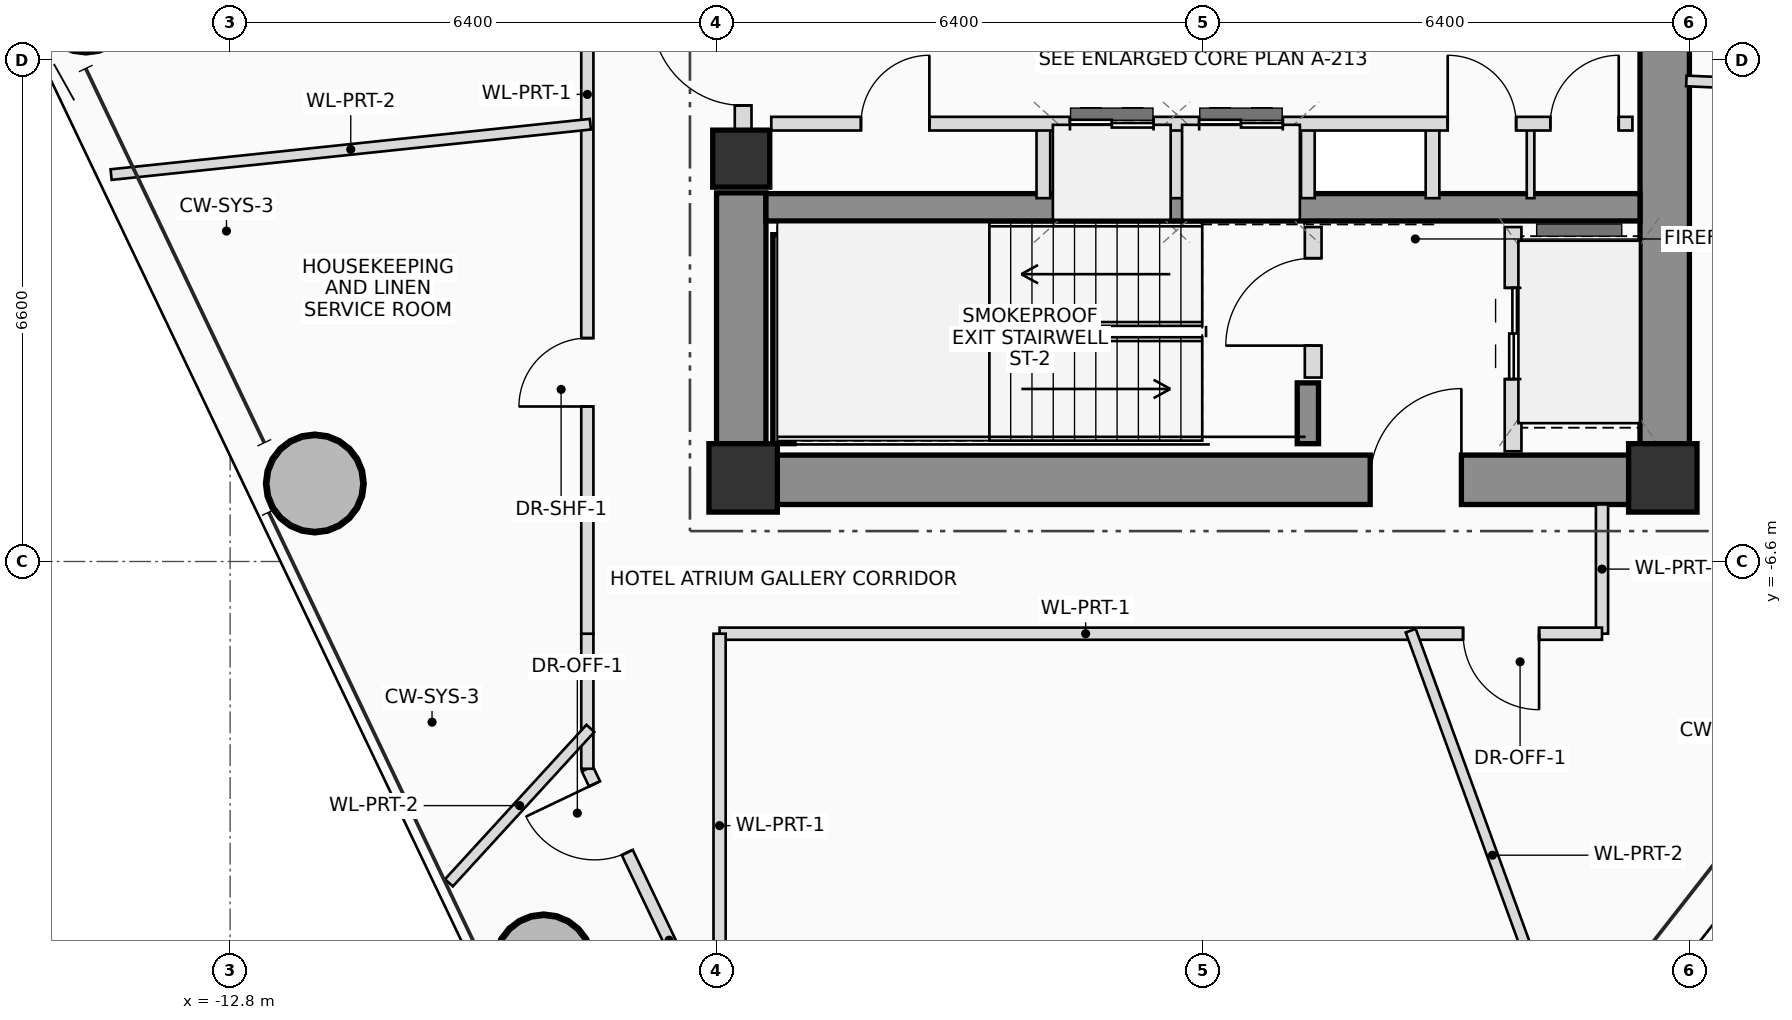
"""IFC4 building model, lengths in metres.
Left out: names, types, materials, properties, quantities, classifications, styles, units other than length and angle.
Written with IfcOpenShell. Run it as: python <this file> out.ifc"""

import sys

from ifc_helpers import new_model, si_unit, direction, frame, frame_2d, origin, origin_2d, place, context, subcontext, project, spatial, rectangle, hollow_circle, extrude, source, transform, mapped, element, fill, save


model = new_model("IFC4")
c1 = context("Model", 3, precision=1e-05, world=origin(), true_north=direction((0.0, 1.0)))
c2 = subcontext(c1, "Body", "Model", "MODEL_VIEW")
j1 = project(units=[si_unit("LENGTHUNIT", "METRE"), si_unit("PLANEANGLEUNIT", "RADIAN")], contexts=[c1])
p1 = place(None, origin())
s1 = spatial("IfcSite", under=j1, at=p1, CompositionType="ELEMENT")
p2 = place(p1, origin())
s2 = spatial("IfcBuilding", under=s1, at=p2, CompositionType="ELEMENT")
p3 = place(p2, frame((0.0, 0.0, 129.5)))
s3 = spatial("IfcBuildingStorey", under=s2, at=p3, CompositionType="ELEMENT", Elevation=129.5)
m1 = source(origin(), c2, "Body", "SweptSolid", [
    extrude(rectangle(XDim=0.9, YDim=0.9, at=origin_2d()), origin(), (0.0, 0.0, 1.0), 3.45),
])
for number, where, z_axis, x_axis in (
    (1, (-6.05, -5.5, 0.0), (0.0, 0.0, 1.0), (1.0, 0.0, 0.0)),
    (2, (6.05, -5.5, 0.0), (0.0, 0.0, 1.0), (1.0, 0.0, 0.0)),
):
    element("IfcColumn", number, at=place(p3, frame(where, z_axis=z_axis, x_axis=x_axis)), inside=s3, PredefinedType="COLUMN", context=c2, shape_type="MappedRepresentation", body=[
        mapped(m1, transform((0.0, 0.0, 0.0), scale=1.0)),
    ])
p4 = place(p3, frame((-6.4, -5.525, 0.0), z_axis=(0.0, 0.0, 1.0), x_axis=(1.0, 0.0, 0.0)))
e3 = element("IfcWall", 3, at=p4, inside=s3, PredefinedType="SHEAR", context=c2, shape_type="SweptSolid", body=[
    extrude(rectangle(XDim=12.8, YDim=0.65, at=frame_2d((6.4, 0.0))), origin(), (0.0, 0.0, 1.0), 3.45),
])
p5 = place(p4, frame((8.6, 0.0, 0.0)))
e4 = element("IfcOpeningElement", 4, at=p5, cuts=e3, PredefinedType="OPENING", context=c2, shape_type="SweptSolid", body=[
    extrude(rectangle(XDim=1.2, YDim=2.2, at=frame_2d((0.6, 1.1))), frame((0.0, 0.335, 0.0), z_axis=(0.0, -1.0, 0.0), x_axis=(1.0, 0.0, 0.0)), (0.0, 0.0, 1.0), 0.67),
])
p6 = place(p3, frame((6.075, -5.2, 0.0), z_axis=(0.0, 0.0, 1.0), x_axis=(0.0, 1.0, 0.0)))
e5 = element("IfcWall", 5, at=p6, inside=s3, PredefinedType="SHEAR", context=c2, shape_type="SweptSolid", body=[
    extrude(rectangle(XDim=10.4, YDim=0.65, at=frame_2d((5.2, 0.0))), origin(), (0.0, 0.0, 1.0), 3.45),
])
p7 = place(p3, frame((-6.075, -5.2, 0.0), z_axis=(0.0, 0.0, 1.0), x_axis=(0.0, 1.0, 0.0)))
e6 = element("IfcWall", 6, at=p7, inside=s3, PredefinedType="SHEAR", context=c2, shape_type="SweptSolid", body=[
    extrude(rectangle(XDim=3.45, YDim=0.65, at=frame_2d((1.725, 0.0))), origin(), (0.0, 0.0, 1.0), 3.45),
])
p8 = place(p3, frame((-5.75, -1.94, 0.0), z_axis=(0.0, 0.0, 1.0), x_axis=(1.0, 0.0, 0.0)))
e7 = element("IfcWall", 7, at=p8, inside=s3, PredefinedType="SHEAR", context=c2, shape_type="SweptSolid", body=[
    extrude(rectangle(XDim=11.5, YDim=0.36, at=frame_2d((5.75, 0.0))), origin(), (0.0, 0.0, 1.0), 3.45),
])
p9 = place(p3, frame((-5.52, -5.05, 0.0), z_axis=(0.0, 0.0, 1.0), x_axis=(0.0, 1.0, 0.0)))
e8 = element("IfcWall", 8, at=p9, inside=s3, PredefinedType="SHEAR", context=c2, shape_type="SweptSolid", body=[
    extrude(rectangle(XDim=2.75, YDim=0.28, at=frame_2d((1.375, 0.0))), origin(), (0.0, 0.0, 1.0), 3.45),
])
p10 = place(p3, frame((1.38, -5.05, 0.0), z_axis=(0.0, 0.0, 1.0), x_axis=(0.0, 1.0, 0.0)))
e9 = element("IfcWall", 9, at=p10, inside=s3, PredefinedType="SHEAR", context=c2, shape_type="SweptSolid", body=[
    extrude(rectangle(XDim=0.8, YDim=0.28, at=frame_2d((0.4, 0.0))), origin(), (0.0, 0.0, 1.0), 3.45),
])
m2 = source(origin(), c2, "Body", "SweptSolid", [
    extrude(rectangle(XDim=0.75, YDim=0.75, at=origin_2d()), origin(), (0.0, 0.0, 1.0), 3.45),
])
p11 = place(p3, frame((-6.075, -1.3, 0.0), z_axis=(0.0, 0.0, 1.0), x_axis=(1.0, 0.0, 0.0)))
e10 = element("IfcColumn", 10, at=p11, inside=s3, PredefinedType="COLUMN", context=c2, shape_type="MappedRepresentation", body=[
    mapped(m2, transform((0.0, 0.0, 0.0), scale=1.0)),
])
m3 = source(origin(), c2, "Body", "SweptSolid", [
    extrude(hollow_circle(Radius=0.65, WallThickness=0.045, at=origin_2d()), origin(), (0.0, 0.0, 1.0), 3.45),
])
for number, where, z_axis, x_axis in (
    (11, (-14.697, 0.74, 0.0), (0.0, 0.0, 1.0), (1.0, 0.0, 0.0)),
    (12, (-11.685, -5.573, 0.0), (0.0, 0.0, 1.0), (1.0, 0.0, 0.0)),
    (13, (-8.674, -11.888, 0.0), (0.0, 0.0, 1.0), (1.0, 0.0, 0.0)),
):
    element("IfcColumn", number, at=place(p3, frame(where, z_axis=z_axis, x_axis=x_axis)), inside=s3, PredefinedType="COLUMN", context=c2, shape_type="MappedRepresentation", body=[
        mapped(m3, transform((0.0, 0.0, 0.0), scale=1.0)),
    ])
p12 = place(p3, frame((-6.05, -0.95, 0.0), z_axis=(0.0, 0.0, 1.0), x_axis=(0.0, 1.0, 0.0)))
e14 = element("IfcWall", 14, at=p12, inside=s3, PredefinedType="PLUMBINGWALL", context=c2, shape_type="SweptSolid", body=[
    extrude(rectangle(XDim=1.9, YDim=0.22, at=frame_2d((0.95, 0.0))), origin(), (0.0, 0.0, 1.0), 2.23),
])
p13 = place(p12, frame((0.35, 0.0, 0.0)))
e15 = element("IfcOpeningElement", 15, at=p13, cuts=e14, PredefinedType="OPENING", context=c2, shape_type="SweptSolid", body=[
    extrude(rectangle(XDim=1.2, YDim=2.2, at=frame_2d((0.6, 1.1))), frame((0.0, 0.12, 0.0), z_axis=(0.0, -1.0, 0.0), x_axis=(1.0, 0.0, 0.0)), (0.0, 0.0, 1.0), 0.24),
])
p14 = place(p3, frame((1.45, -4.18, 0.0), z_axis=(0.0, 0.0, 1.0), x_axis=(0.0, 1.0, 0.0)))
e16 = element("IfcWall", 16, at=p14, inside=s3, PredefinedType="PLUMBINGWALL", context=c2, shape_type="SweptSolid", body=[
    extrude(rectangle(XDim=1.98, YDim=0.22, at=frame_2d((0.99, 0.0))), origin(), (0.0, 0.0, 1.0), 3.25),
])
p15 = place(p14, frame((0.42, 0.0, 0.0)))
e17 = element("IfcOpeningElement", 17, at=p15, cuts=e16, PredefinedType="OPENING", context=c2, shape_type="SweptSolid", body=[
    extrude(rectangle(XDim=1.15, YDim=2.15, at=frame_2d((0.575, 1.075))), frame((0.0, 0.12, 0.0), z_axis=(0.0, -1.0, 0.0), x_axis=(1.0, 0.0, 0.0)), (0.0, 0.0, 1.0), 0.24),
])
p16 = place(p3, frame((4.08, -5.15, 0.0), z_axis=(0.0, 0.0, 1.0), x_axis=(0.0, 1.0, 0.0)))
e18 = element("IfcWall", 18, at=p16, inside=s3, PredefinedType="PLUMBINGWALL", context=c2, shape_type="SweptSolid", body=[
    extrude(rectangle(XDim=2.95, YDim=0.22, at=frame_2d((1.475, 0.0))), origin(), (0.0, 0.0, 1.0), 3.25),
])
p17 = place(p16, frame((0.95, 0.0, 0.0)))
e19 = element("IfcOpeningElement", 19, at=p17, cuts=e18, PredefinedType="OPENING", context=c2, shape_type="SweptSolid", body=[
    extrude(rectangle(XDim=1.2, YDim=2.25, at=frame_2d((0.6, 1.125))), frame((0.0, 0.12, 0.0), z_axis=(0.0, -1.0, 0.0), x_axis=(1.0, 0.0, 0.0)), (0.0, 0.0, 1.0), 0.24),
])
for number, where, z_axis, x_axis in (
    (20, (-2.1, -1.82, 0.0), (0.0, 0.0, 1.0), (0.0, 1.0, 0.0)),
    (21, (-0.35, -1.82, 0.0), (0.0, 0.0, 1.0), (0.0, 1.0, 0.0)),
    (22, (1.38, -1.82, 0.0), (0.0, 0.0, 1.0), (0.0, 1.0, 0.0)),
    (23, (3.02, -1.82, 0.0), (0.0, 0.0, 1.0), (0.0, 1.0, 0.0)),
):
    element("IfcWall", number, at=place(p3, frame(where, z_axis=z_axis, x_axis=x_axis)), inside=s3, PredefinedType="PLUMBINGWALL", context=c2, shape_type="SweptSolid", body=[
        extrude(rectangle(XDim=0.98, YDim=0.18, at=frame_2d((0.49, 0.0))), origin(), (0.0, 0.0, 1.0), 3.25),
    ])
p18 = place(p3, frame((4.31, -1.82, 0.0), z_axis=(0.0, 0.0, 1.0), x_axis=(0.0, 1.0, 0.0)))
e24 = element("IfcWall", 24, at=p18, inside=s3, PredefinedType="PARTITIONING", context=c2, shape_type="SweptSolid", body=[
    extrude(rectangle(XDim=0.98, YDim=0.1, at=frame_2d((0.49, 0.0))), origin(), (0.0, 0.0, 1.0), 3.25),
])
p19 = place(p3, frame((-5.68, -0.84, 0.0), z_axis=(0.0, 0.0, 1.0), x_axis=(1.0, 0.0, 0.0)))
e25 = element("IfcWall", 25, at=p19, inside=s3, PredefinedType="PLUMBINGWALL", context=c2, shape_type="SweptSolid", body=[
    extrude(rectangle(XDim=11.33, YDim=0.18, at=frame_2d((5.665, 0.0))), origin(), (0.0, 0.0, 1.0), 3.25),
])
p20 = place(p19, frame((1.18, 0.0, 0.0)))
e26 = element("IfcOpeningElement", 26, at=p20, cuts=e25, PredefinedType="OPENING", context=c2, shape_type="SweptSolid", body=[
    extrude(rectangle(XDim=0.9, YDim=2.05, at=frame_2d((0.45, 1.025))), frame((0.0, 0.1, 0.0), z_axis=(0.0, -1.0, 0.0), x_axis=(1.0, 0.0, 0.0)), (0.0, 0.0, 1.0), 0.2),
])
p21 = place(p19, frame((3.93, 0.0, 0.0)))
e27 = element("IfcOpeningElement", 27, at=p21, cuts=e25, PredefinedType="OPENING", context=c2, shape_type="SweptSolid", body=[
    extrude(rectangle(XDim=1.1, YDim=2.2, at=frame_2d((0.55, 1.1))), frame((0.0, 0.1, 0.0), z_axis=(0.0, -1.0, 0.0), x_axis=(1.0, 0.0, 0.0)), (0.0, 0.0, 1.0), 0.2),
])
p22 = place(p19, frame((5.63, 0.0, 0.0)))
e28 = element("IfcOpeningElement", 28, at=p22, cuts=e25, PredefinedType="OPENING", context=c2, shape_type="SweptSolid", body=[
    extrude(rectangle(XDim=1.1, YDim=2.2, at=frame_2d((0.55, 1.1))), frame((0.0, 0.1, 0.0), z_axis=(0.0, -1.0, 0.0), x_axis=(1.0, 0.0, 0.0)), (0.0, 0.0, 1.0), 0.2),
])
p23 = place(p19, frame((8.9, 0.0, 0.0)))
e29 = element("IfcOpeningElement", 29, at=p23, cuts=e25, PredefinedType="OPENING", context=c2, shape_type="SweptSolid", body=[
    extrude(rectangle(XDim=0.9, YDim=2.05, at=frame_2d((0.45, 1.025))), frame((0.0, 0.1, 0.0), z_axis=(0.0, -1.0, 0.0), x_axis=(1.0, 0.0, 0.0)), (0.0, 0.0, 1.0), 0.2),
])
p24 = place(p19, frame((10.25, 0.0, 0.0)))
e30 = element("IfcOpeningElement", 30, at=p24, cuts=e25, PredefinedType="OPENING", context=c2, shape_type="SweptSolid", body=[
    extrude(rectangle(XDim=0.9, YDim=2.05, at=frame_2d((0.45, 1.025))), frame((0.0, 0.1, 0.0), z_axis=(0.0, -1.0, 0.0), x_axis=(1.0, 0.0, 0.0)), (0.0, 0.0, 1.0), 0.2),
])
p25 = place(p3, frame((-6.539, -12.6, 0.0), z_axis=(0.0, 0.0, 1.0), x_axis=(-0.430521464151, 0.902580339308, 0.0)))
e31 = element("IfcWall", 31, at=p25, inside=s3, PredefinedType="PARTITIONING", context=c2, shape_type="SweptSolid", body=[
    extrude(rectangle(XDim=3.626, YDim=0.16, at=frame_2d((1.813, 0.0))), origin(), (0.0, 0.0, 1.0), 2.605),
])
p26 = place(p25, frame((2.406, 0.0, 0.0)))
e32 = element("IfcOpeningElement", 32, at=p26, cuts=e31, PredefinedType="OPENING", context=c2, shape_type="SweptSolid", body=[
    extrude(rectangle(XDim=1.0, YDim=2.25, at=frame_2d((0.5, 1.125))), frame((0.0, 0.09, 0.0), z_axis=(0.0, -1.0, 0.0), x_axis=(1.0, 0.0, 0.0)), (0.0, 0.0, 1.0), 0.18),
])
p27 = place(p3, frame((-8.1, -9.327, 0.0), z_axis=(0.0, 0.0, 1.0), x_axis=(0.0, 1.0, 0.0)))
e33 = element("IfcWall", 33, at=p27, inside=s3, PredefinedType="PARTITIONING", context=c2, shape_type="SweptSolid", body=[
    extrude(rectangle(XDim=1.777, YDim=0.16, at=frame_2d((0.888, 0.0))), origin(), (0.0, 0.0, 1.0), 3.25),
])
p28 = place(p3, frame((-8.1, -7.55, 0.0), z_axis=(0.0, 0.0, 1.0), x_axis=(0.0, 1.0, 0.0)))
e34 = element("IfcWall", 34, at=p28, inside=s3, PredefinedType="PARTITIONING", context=c2, shape_type="SweptSolid", body=[
    extrude(rectangle(XDim=15.1, YDim=0.16, at=frame_2d((7.55, 0.0))), origin(), (0.0, 0.0, 1.0), 2.605),
])
p29 = place(p28, frame((2.989, 0.0, 0.0)))
e35 = element("IfcOpeningElement", 35, at=p29, cuts=e34, PredefinedType="OPENING", context=c2, shape_type="SweptSolid", body=[
    extrude(rectangle(XDim=0.9, YDim=2.05, at=frame_2d((0.45, 1.025))), frame((0.0, 0.09, 0.0), z_axis=(0.0, -1.0, 0.0), x_axis=(1.0, 0.0, 0.0)), (0.0, 0.0, 1.0), 0.18),
])
p30 = place(p28, frame((10.301, 0.0, 0.0)))
e36 = element("IfcOpeningElement", 36, at=p30, cuts=e34, PredefinedType="OPENING", context=c2, shape_type="SweptSolid", body=[
    extrude(rectangle(XDim=1.0, YDim=2.25, at=frame_2d((0.5, 1.125))), frame((0.0, 0.09, 0.0), z_axis=(0.0, -1.0, 0.0), x_axis=(1.0, 0.0, 0.0)), (0.0, 0.0, 1.0), 0.18),
])
p31 = place(p3, frame((5.25, -5.85, 0.0), z_axis=(0.0, 0.0, 1.0), x_axis=(0.0, -1.0, 0.0)))
e37 = element("IfcWall", 37, at=p31, inside=s3, PredefinedType="PARTITIONING", context=c2, shape_type="SweptSolid", body=[
    extrude(rectangle(XDim=1.7, YDim=0.16, at=frame_2d((0.85, 0.0))), origin(), (0.0, 0.0, 1.0), 3.25),
])
p32 = place(p3, frame((5.25, -7.55, 0.0), z_axis=(0.0, 0.0, 1.0), x_axis=(-1.0, 0.0, 0.0)))
e38 = element("IfcWall", 38, at=p32, inside=s3, PredefinedType="PARTITIONING", context=c2, shape_type="SweptSolid", body=[
    extrude(rectangle(XDim=11.61, YDim=0.16, at=frame_2d((5.805, 0.0))), origin(), (0.0, 0.0, 1.0), 2.605),
])
p33 = place(p32, frame((0.828, 0.0, 0.0)))
e39 = element("IfcOpeningElement", 39, at=p33, cuts=e38, PredefinedType="OPENING", context=c2, shape_type="SweptSolid", body=[
    extrude(rectangle(XDim=1.0, YDim=2.25, at=frame_2d((0.5, 1.125))), frame((0.0, 0.09, 0.0), z_axis=(0.0, -1.0, 0.0), x_axis=(1.0, 0.0, 0.0)), (0.0, 0.0, 1.0), 0.18),
])
p34 = place(p3, frame((-6.36, -7.55, 0.0), z_axis=(0.0, 0.0, 1.0), x_axis=(0.0, -1.0, 0.0)))
e40 = element("IfcWall", 40, at=p34, inside=s3, PredefinedType="PARTITIONING", context=c2, shape_type="SweptSolid", body=[
    extrude(rectangle(XDim=5.05, YDim=0.16, at=frame_2d((2.525, 0.0))), origin(), (0.0, 0.0, 1.0), 3.25),
])
p35 = place(p3, frame((6.36, -0.278, 0.0), z_axis=(0.0, 0.0, 1.0), x_axis=(0.999047707238, -0.043631166178, 0.0)))
e41 = element("IfcWall", 41, at=p35, inside=s3, PredefinedType="PARTITIONING", context=c2, shape_type="SweptSolid", body=[
    extrude(rectangle(XDim=8.522, YDim=0.14, at=frame_2d((4.261, 0.0))), origin(), (0.0, 0.0, 1.0), 2.605),
])
p36 = place(p3, frame((-8.06, -0.847, 0.0), z_axis=(0.0, 0.0, 1.0), x_axis=(-0.994520422967, -0.104542471285, 0.0)))
e42 = element("IfcWall", 42, at=p36, inside=s3, PredefinedType="PARTITIONING", context=c2, shape_type="SweptSolid", body=[
    extrude(rectangle(XDim=6.34, YDim=0.14, at=frame_2d((3.17, 0.0))), origin(), (0.0, 0.0, 1.0), 2.765),
])
p37 = place(p3, frame((-8.06, -8.796, 0.0), z_axis=(0.0, 0.0, 1.0), x_axis=(-0.67555207399, -0.737312278026, 0.0)))
e43 = element("IfcWall", 43, at=p37, inside=s3, PredefinedType="PARTITIONING", context=c2, shape_type="SweptSolid", body=[
    extrude(rectangle(XDim=2.755, YDim=0.14, at=frame_2d((1.378, 0.0))), origin(), (0.0, 0.0, 1.0), 2.765),
])
p38 = place(p3, frame((2.733, -7.51, 0.0), z_axis=(0.0, 0.0, 1.0), x_axis=(0.342029891784, -0.93968907258, 0.0)))
e44 = element("IfcWall", 44, at=p38, inside=s3, PredefinedType="PARTITIONING", context=c2, shape_type="SweptSolid", body=[
    extrude(rectangle(XDim=6.287, YDim=0.14, at=frame_2d((3.144, 0.0))), origin(), (0.0, 0.0, 1.0), 2.805),
])
p39 = place(p5, origin())
e45 = element("IfcDoor", 45, at=p39, inside=s3, OperationType="SINGLE_SWING_RIGHT", PredefinedType="DOOR", context=c2, shape_type="SweptSolid", body=[
    extrude(rectangle(XDim=1.2, YDim=2.2, at=frame_2d((0.6, 1.1))), frame((0.0, 0.025, 0.0), z_axis=(0.0, -1.0, 0.0), x_axis=(1.0, 0.0, 0.0)), (0.0, 0.0, 1.0), 0.05),
])
fill(e4, e45)
p40 = place(p13, origin())
e46 = element("IfcDoor", 46, at=p40, inside=s3, OperationType="SINGLE_SWING_RIGHT", PredefinedType="DOOR", context=c2, shape_type="SweptSolid", body=[
    extrude(rectangle(XDim=1.2, YDim=2.2, at=frame_2d((0.6, 1.1))), frame((0.0, 0.025, 0.0), z_axis=(0.0, -1.0, 0.0), x_axis=(1.0, 0.0, 0.0)), (0.0, 0.0, 1.0), 0.05),
])
fill(e15, e46)
p41 = place(p15, origin())
e47 = element("IfcDoor", 47, at=p41, inside=s3, OperationType="SINGLE_SWING_LEFT", PredefinedType="DOOR", context=c2, shape_type="SweptSolid", body=[
    extrude(rectangle(XDim=1.15, YDim=2.15, at=frame_2d((0.575, 1.075))), frame((0.0, 0.025, 0.0), z_axis=(0.0, -1.0, 0.0), x_axis=(1.0, 0.0, 0.0)), (0.0, 0.0, 1.0), 0.05),
])
fill(e17, e47)
p42 = place(p17, origin())
e48 = element("IfcDoor", 48, at=p42, inside=s3, OperationType="DOUBLE_DOOR_SLIDING", PredefinedType="DOOR", context=c2, shape_type="SweptSolid", body=[
    extrude(rectangle(XDim=1.2, YDim=2.25, at=frame_2d((0.6, 1.125))), frame((0.0, 0.025, 0.0), z_axis=(0.0, -1.0, 0.0), x_axis=(1.0, 0.0, 0.0)), (0.0, 0.0, 1.0), 0.05),
])
fill(e19, e48)
p43 = place(p20, origin())
e49 = element("IfcDoor", 49, at=p43, inside=s3, OperationType="SINGLE_SWING_RIGHT", PredefinedType="DOOR", context=c2, shape_type="SweptSolid", body=[
    extrude(rectangle(XDim=0.9, YDim=2.05, at=frame_2d((0.45, 1.025))), frame((0.0, 0.025, 0.0), z_axis=(0.0, -1.0, 0.0), x_axis=(1.0, 0.0, 0.0)), (0.0, 0.0, 1.0), 0.05),
])
fill(e26, e49)
p44 = place(p21, origin())
e50 = element("IfcDoor", 50, at=p44, inside=s3, OperationType="DOUBLE_DOOR_SLIDING", PredefinedType="DOOR", context=c2, shape_type="SweptSolid", body=[
    extrude(rectangle(XDim=1.1, YDim=2.2, at=frame_2d((0.55, 1.1))), frame((0.0, 0.025, 0.0), z_axis=(0.0, -1.0, 0.0), x_axis=(1.0, 0.0, 0.0)), (0.0, 0.0, 1.0), 0.05),
])
fill(e27, e50)
p45 = place(p22, origin())
e51 = element("IfcDoor", 51, at=p45, inside=s3, OperationType="DOUBLE_DOOR_SLIDING", PredefinedType="DOOR", context=c2, shape_type="SweptSolid", body=[
    extrude(rectangle(XDim=1.1, YDim=2.2, at=frame_2d((0.55, 1.1))), frame((0.0, 0.025, 0.0), z_axis=(0.0, -1.0, 0.0), x_axis=(1.0, 0.0, 0.0)), (0.0, 0.0, 1.0), 0.05),
])
fill(e28, e51)
p46 = place(p23, origin())
e52 = element("IfcDoor", 52, at=p46, inside=s3, OperationType="SINGLE_SWING_LEFT", PredefinedType="DOOR", context=c2, shape_type="SweptSolid", body=[
    extrude(rectangle(XDim=0.9, YDim=2.05, at=frame_2d((0.45, 1.025))), frame((0.0, 0.025, 0.0), z_axis=(0.0, -1.0, 0.0), x_axis=(1.0, 0.0, 0.0)), (0.0, 0.0, 1.0), 0.05),
])
fill(e29, e52)
p47 = place(p24, origin())
e53 = element("IfcDoor", 53, at=p47, inside=s3, OperationType="SINGLE_SWING_RIGHT", PredefinedType="DOOR", context=c2, shape_type="SweptSolid", body=[
    extrude(rectangle(XDim=0.9, YDim=2.05, at=frame_2d((0.45, 1.025))), frame((0.0, 0.025, 0.0), z_axis=(0.0, -1.0, 0.0), x_axis=(1.0, 0.0, 0.0)), (0.0, 0.0, 1.0), 0.05),
])
fill(e30, e53)
p48 = place(p26, origin())
e54 = element("IfcDoor", 54, at=p48, inside=s3, OperationType="SINGLE_SWING_RIGHT", PredefinedType="DOOR", context=c2, shape_type="SweptSolid", body=[
    extrude(rectangle(XDim=1.0, YDim=2.25, at=frame_2d((0.5, 1.125))), frame((0.0, 0.025, 0.0), z_axis=(0.0, -1.0, 0.0), x_axis=(1.0, 0.0, 0.0)), (0.0, 0.0, 1.0), 0.05),
])
fill(e32, e54)
p49 = place(p29, origin())
e55 = element("IfcDoor", 55, at=p49, inside=s3, OperationType="SINGLE_SWING_LEFT", PredefinedType="DOOR", context=c2, shape_type="SweptSolid", body=[
    extrude(rectangle(XDim=0.9, YDim=2.05, at=frame_2d((0.45, 1.025))), frame((0.0, 0.025, 0.0), z_axis=(0.0, -1.0, 0.0), x_axis=(1.0, 0.0, 0.0)), (0.0, 0.0, 1.0), 0.05),
])
fill(e35, e55)
p50 = place(p33, origin())
e56 = element("IfcDoor", 56, at=p50, inside=s3, OperationType="SINGLE_SWING_LEFT", PredefinedType="DOOR", context=c2, shape_type="SweptSolid", body=[
    extrude(rectangle(XDim=1.0, YDim=2.25, at=frame_2d((0.5, 1.125))), frame((0.0, 0.025, 0.0), z_axis=(0.0, -1.0, 0.0), x_axis=(1.0, 0.0, 0.0)), (0.0, 0.0, 1.0), 0.05),
])
fill(e39, e56)
save(model, sys.argv[1])
